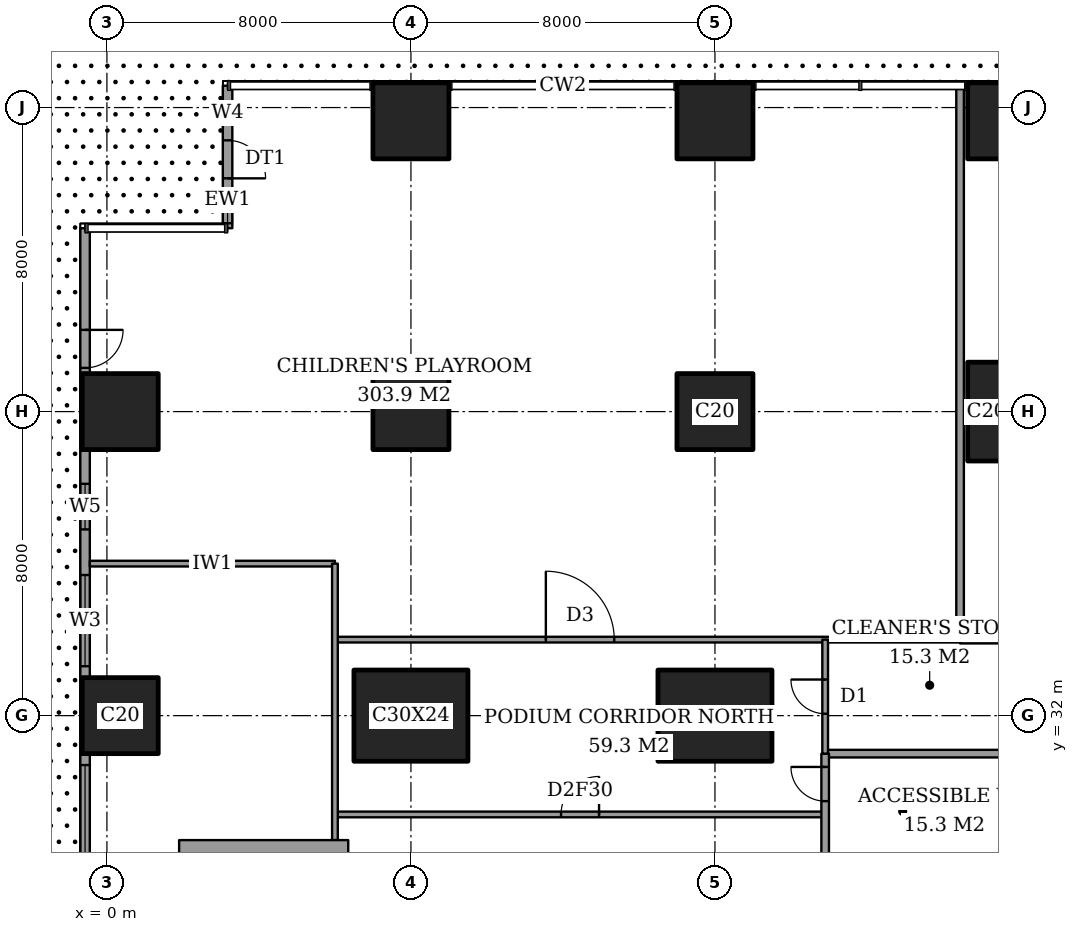
"""IFC4 building model, lengths in metres.
Left out: names, types, materials, properties, quantities, classifications, styles, units other than length and angle.
Written with IfcOpenShell. Run it as: python <this file> out.ifc"""

import sys

from ifc_helpers import new_model, si_unit, direction, frame, frame_2d, origin, origin_2d, place, context, subcontext, project, spatial, rectangle, extrude, element, fill, save


model = new_model("IFC4")
c1 = context("Model", 3, precision=1e-05, world=origin(), true_north=direction((0.0, 1.0)))
c2 = subcontext(c1, "Body", "Model", "MODEL_VIEW")
j1 = project(units=[si_unit("LENGTHUNIT", "METRE"), si_unit("PLANEANGLEUNIT", "RADIAN")], contexts=[c1])
p1 = place(None, origin())
s1 = spatial("IfcSite", under=j1, at=p1, CompositionType="ELEMENT")
p2 = place(p1, origin())
s2 = spatial("IfcBuilding", under=s1, at=p2, CompositionType="ELEMENT")
p3 = place(p2, frame((0.0, 0.0, 16.0)))
s3 = spatial("IfcBuildingStorey", under=s2, at=p3, CompositionType="ELEMENT", Elevation=16.0)
for number, where, z_axis, x_axis in (
    (1, (0.35, 32.0, 0.0), (0.0, 0.0, 1.0), (1.0, 0.0, 0.0)),
    (2, (0.35, 40.0, 0.0), (0.0, 0.0, 1.0), (1.0, 0.0, 0.0)),
):
    element("IfcColumn", number, at=place(p3, frame(where, z_axis=z_axis, x_axis=x_axis)), inside=s3, PredefinedType="COLUMN", context=c2, shape_type="SweptSolid", body=[
        extrude(rectangle(XDim=2.0, YDim=2.0, at=origin_2d()), origin(), (0.0, 0.0, 1.0), 5.0),
    ])
p4 = place(p3, frame((8.0, 32.0, 0.0), z_axis=(0.0, 0.0, 1.0), x_axis=(1.0, 0.0, 0.0)))
e3 = element("IfcColumn", 3, at=p4, inside=s3, PredefinedType="COLUMN", context=c2, shape_type="SweptSolid", body=[
    extrude(rectangle(XDim=3.0, YDim=2.4, at=origin_2d()), origin(), (0.0, 0.0, 1.0), 5.0),
])
for number, where, z_axis, x_axis in (
    (4, (8.0, 40.0, 0.0), (0.0, 0.0, 1.0), (1.0, 0.0, 0.0)),
    (5, (8.0, 47.65, 0.0), (0.0, 0.0, 1.0), (1.0, 0.0, 0.0)),
):
    element("IfcColumn", number, at=place(p3, frame(where, z_axis=z_axis, x_axis=x_axis)), inside=s3, PredefinedType="COLUMN", context=c2, shape_type="SweptSolid", body=[
        extrude(rectangle(XDim=2.0, YDim=2.0, at=origin_2d()), origin(), (0.0, 0.0, 1.0), 5.0),
    ])
p5 = place(p3, frame((16.0, 32.0, 0.0), z_axis=(0.0, 0.0, 1.0), x_axis=(1.0, 0.0, 0.0)))
e6 = element("IfcColumn", 6, at=p5, inside=s3, PredefinedType="COLUMN", context=c2, shape_type="SweptSolid", body=[
    extrude(rectangle(XDim=3.0, YDim=2.4, at=origin_2d()), origin(), (0.0, 0.0, 1.0), 5.0),
])
for number, where, z_axis, x_axis in (
    (7, (16.0, 40.0, 0.0), (0.0, 0.0, 1.0), (1.0, 0.0, 0.0)),
    (8, (16.0, 47.65, 0.0), (0.0, 0.0, 1.0), (1.0, 0.0, 0.0)),
):
    element("IfcColumn", number, at=place(p3, frame(where, z_axis=z_axis, x_axis=x_axis)), inside=s3, PredefinedType="COLUMN", context=c2, shape_type="SweptSolid", body=[
        extrude(rectangle(XDim=2.0, YDim=2.0, at=origin_2d()), origin(), (0.0, 0.0, 1.0), 5.0),
    ])
p6 = place(p3, frame((23.65, 40.0, 0.0), z_axis=(0.0, 0.0, 1.0), x_axis=(1.0, 0.0, 0.0)))
e9 = element("IfcColumn", 9, at=p6, inside=s3, PredefinedType="COLUMN", context=c2, shape_type="SweptSolid", body=[
    extrude(rectangle(XDim=2.0, YDim=2.6, at=origin_2d()), origin(), (0.0, 0.0, 1.0), 5.0),
])
p7 = place(p3, frame((23.65, 47.65, 0.0), z_axis=(0.0, 0.0, 1.0), x_axis=(1.0, 0.0, 0.0)))
e10 = element("IfcColumn", 10, at=p7, inside=s3, PredefinedType="COLUMN", context=c2, shape_type="SweptSolid", body=[
    extrude(rectangle(XDim=2.0, YDim=2.0, at=origin_2d()), origin(), (0.0, 0.0, 1.0), 5.0),
])
p8 = place(p3, frame((6.35, 28.35, 0.0), z_axis=(0.0, 0.0, 1.0), x_axis=(-1.0, 0.0, 0.0)))
e11 = element("IfcWall", 11, at=p8, inside=s3, PredefinedType="SHEAR", context=c2, shape_type="SweptSolid", body=[
    extrude(rectangle(XDim=4.45, YDim=0.75, at=frame_2d((2.225, 0.0))), origin(), (0.0, 0.0, 1.0), 5.0),
])
p9 = place(p3, frame((3.175, 48.575, 0.0), z_axis=(0.0, 0.0, 1.0), x_axis=(0.0, -1.0, 0.0)))
e12 = element("IfcWall", 12, at=p9, inside=s3, PredefinedType="SOLIDWALL", context=c2, shape_type="SweptSolid", body=[
    extrude(rectangle(XDim=3.75, YDim=0.25, at=frame_2d((1.875, 0.0))), origin(), (0.0, 0.0, 1.0), 5.0),
])
p10 = place(p9, frame((1.438, 0.0, 0.0)))
e13 = element("IfcOpeningElement", 13, at=p10, cuts=e12, PredefinedType="OPENING", context=c2, shape_type="SweptSolid", body=[
    extrude(rectangle(XDim=1.0, YDim=2.4, at=frame_2d((0.5, 1.2))), frame((0.0, 0.135, 0.0), z_axis=(0.0, -1.0, 0.0), x_axis=(1.0, 0.0, 0.0)), (0.0, 0.0, 1.0), 0.27),
])
p11 = place(p9, frame((0.406, 0.0, 0.6)))
e14 = element("IfcOpeningElement", 14, at=p11, cuts=e12, PredefinedType="OPENING", context=c2, shape_type="SweptSolid", body=[
    extrude(rectangle(XDim=0.6, YDim=3.0, at=frame_2d((0.3, 1.5))), frame((0.0, 0.135, 0.0), z_axis=(0.0, -1.0, 0.0), x_axis=(1.0, 0.0, 0.0)), (0.0, 0.0, 1.0), 0.27),
])
p12 = place(p9, frame((3.019, 0.0, 0.6)))
e15 = element("IfcOpeningElement", 15, at=p12, cuts=e12, PredefinedType="OPENING", context=c2, shape_type="SweptSolid", body=[
    extrude(rectangle(XDim=0.6, YDim=3.0, at=frame_2d((0.3, 1.5))), frame((0.0, 0.135, 0.0), z_axis=(0.0, -1.0, 0.0), x_axis=(1.0, 0.0, 0.0)), (0.0, 0.0, 1.0), 0.27),
])
p13 = place(p3, frame((-0.575, 44.825, 0.0), z_axis=(0.0, 0.0, 1.0), x_axis=(0.0, -1.0, 0.0)))
e16 = element("IfcWall", 16, at=p13, inside=s3, PredefinedType="SOLIDWALL", context=c2, shape_type="SweptSolid", body=[
    extrude(rectangle(XDim=41.65, YDim=0.25, at=frame_2d((20.825, 0.0))), origin(), (0.0, 0.0, 1.0), 5.0),
])
p14 = place(p13, frame((2.675, 0.0, 0.0)))
e17 = element("IfcOpeningElement", 17, at=p14, cuts=e16, PredefinedType="OPENING", context=c2, shape_type="SweptSolid", body=[
    extrude(rectangle(XDim=1.0, YDim=2.4, at=frame_2d((0.5, 1.2))), frame((0.0, 0.135, 0.0), z_axis=(0.0, -1.0, 0.0), x_axis=(1.0, 0.0, 0.0)), (0.0, 0.0, 1.0), 0.27),
])
p15 = place(p13, frame((6.725, 0.0, 0.6)))
e18 = element("IfcOpeningElement", 18, at=p15, cuts=e16, PredefinedType="OPENING", context=c2, shape_type="SweptSolid", body=[
    extrude(rectangle(XDim=1.2, YDim=3.0, at=frame_2d((0.6, 1.5))), frame((0.0, 0.135, 0.0), z_axis=(0.0, -1.0, 0.0), x_axis=(1.0, 0.0, 0.0)), (0.0, 0.0, 1.0), 0.27),
])
p16 = place(p13, frame((9.125, 0.0, 0.6)))
e19 = element("IfcOpeningElement", 19, at=p16, cuts=e16, PredefinedType="OPENING", context=c2, shape_type="SweptSolid", body=[
    extrude(rectangle(XDim=2.4, YDim=3.0, at=frame_2d((1.2, 1.5))), frame((0.0, 0.135, 0.0), z_axis=(0.0, -1.0, 0.0), x_axis=(1.0, 0.0, 0.0)), (0.0, 0.0, 1.0), 0.27),
])
p17 = place(p13, frame((14.125, 0.0, 0.6)))
e20 = element("IfcOpeningElement", 20, at=p17, cuts=e16, PredefinedType="OPENING", context=c2, shape_type="SweptSolid", body=[
    extrude(rectangle(XDim=2.4, YDim=3.0, at=frame_2d((1.2, 1.5))), frame((0.0, 0.135, 0.0), z_axis=(0.0, -1.0, 0.0), x_axis=(1.0, 0.0, 0.0)), (0.0, 0.0, 1.0), 0.27),
])
p18 = place(p13, frame((17.125, 0.0, 0.6)))
e21 = element("IfcOpeningElement", 21, at=p18, cuts=e16, PredefinedType="OPENING", context=c2, shape_type="SweptSolid", body=[
    extrude(rectangle(XDim=2.4, YDim=3.0, at=frame_2d((1.2, 1.5))), frame((0.0, 0.135, 0.0), z_axis=(0.0, -1.0, 0.0), x_axis=(1.0, 0.0, 0.0)), (0.0, 0.0, 1.0), 0.27),
])
p19 = place(p13, frame((22.125, 0.0, 0.6)))
e22 = element("IfcOpeningElement", 22, at=p19, cuts=e16, PredefinedType="OPENING", context=c2, shape_type="SweptSolid", body=[
    extrude(rectangle(XDim=2.4, YDim=3.0, at=frame_2d((1.2, 1.5))), frame((0.0, 0.135, 0.0), z_axis=(0.0, -1.0, 0.0), x_axis=(1.0, 0.0, 0.0)), (0.0, 0.0, 1.0), 0.27),
])
p20 = place(p13, frame((25.125, 0.0, 0.6)))
e23 = element("IfcOpeningElement", 23, at=p20, cuts=e16, PredefinedType="OPENING", context=c2, shape_type="SweptSolid", body=[
    extrude(rectangle(XDim=2.4, YDim=3.0, at=frame_2d((1.2, 1.5))), frame((0.0, 0.135, 0.0), z_axis=(0.0, -1.0, 0.0), x_axis=(1.0, 0.0, 0.0)), (0.0, 0.0, 1.0), 0.27),
])
p21 = place(p13, frame((30.125, 0.0, 0.6)))
e24 = element("IfcOpeningElement", 24, at=p21, cuts=e16, PredefinedType="OPENING", context=c2, shape_type="SweptSolid", body=[
    extrude(rectangle(XDim=2.4, YDim=3.0, at=frame_2d((1.2, 1.5))), frame((0.0, 0.135, 0.0), z_axis=(0.0, -1.0, 0.0), x_axis=(1.0, 0.0, 0.0)), (0.0, 0.0, 1.0), 0.27),
])
p22 = place(p13, frame((37.975, 0.0, 0.0)))
e25 = element("IfcOpeningElement", 25, at=p22, cuts=e16, PredefinedType="OPENING", context=c2, shape_type="SweptSolid", body=[
    extrude(rectangle(XDim=1.0, YDim=2.4, at=frame_2d((0.5, 1.2))), frame((0.0, 0.135, 0.0), z_axis=(0.0, -1.0, 0.0), x_axis=(1.0, 0.0, 0.0)), (0.0, 0.0, 1.0), 0.27),
])
p23 = place(p13, frame((33.125, 0.0, 0.6)))
e26 = element("IfcOpeningElement", 26, at=p23, cuts=e16, PredefinedType="OPENING", context=c2, shape_type="SweptSolid", body=[
    extrude(rectangle(XDim=2.4, YDim=3.0, at=frame_2d((1.2, 1.5))), frame((0.0, 0.135, 0.0), z_axis=(0.0, -1.0, 0.0), x_axis=(1.0, 0.0, 0.0)), (0.0, 0.0, 1.0), 0.27),
])
p24 = place(p3, frame((6.0, 29.4, 0.0), z_axis=(0.0, 0.0, 1.0), x_axis=(1.0, 0.0, 0.0)))
e27 = element("IfcWall", 27, at=p24, inside=s3, PredefinedType="PARTITIONING", context=c2, shape_type="SweptSolid", body=[
    extrude(rectangle(XDim=12.9, YDim=0.15, at=frame_2d((6.45, 0.0))), origin(), (0.0, 0.0, 1.0), 4.7),
])
p25 = place(p24, frame((5.95, 0.0, 0.0)))
e28 = element("IfcOpeningElement", 28, at=p25, cuts=e27, PredefinedType="OPENING", context=c2, shape_type="SweptSolid", body=[
    extrude(rectangle(XDim=1.0, YDim=2.1, at=frame_2d((0.5, 1.05))), frame((0.0, 0.085, 0.0), z_axis=(0.0, -1.0, 0.0), x_axis=(1.0, 0.0, 0.0)), (0.0, 0.0, 1.0), 0.17),
])
p26 = place(p3, frame((18.9, 31.0, 0.0), z_axis=(0.0, 0.0, 1.0), x_axis=(1.0, 0.0, 0.0)))
e29 = element("IfcWall", 29, at=p26, inside=s3, PredefinedType="PARTITIONING", context=c2, shape_type="SweptSolid", body=[
    extrude(rectangle(XDim=5.1, YDim=0.2, at=frame_2d((2.55, 0.0))), origin(), (0.0, 0.0, 1.0), 4.7),
])
p27 = place(p3, frame((22.45, 34.0, 0.0), z_axis=(0.0, 0.0, 1.0), x_axis=(1.0, 0.0, 0.0)))
e30 = element("IfcWall", 30, at=p27, inside=s3, PredefinedType="PARTITIONING", context=c2, shape_type="SweptSolid", body=[
    extrude(rectangle(XDim=1.55, YDim=0.2, at=frame_2d((0.775, 0.0))), origin(), (0.0, 0.0, 1.0), 4.7),
])
p28 = place(p3, frame((6.0, 34.0, 0.0), z_axis=(0.0, 0.0, 1.0), x_axis=(1.0, 0.0, 0.0)))
e31 = element("IfcWall", 31, at=p28, inside=s3, PredefinedType="PARTITIONING", context=c2, shape_type="SweptSolid", body=[
    extrude(rectangle(XDim=16.45, YDim=0.15, at=frame_2d((8.225, 0.0))), origin(), (0.0, 0.0, 1.0), 4.7),
])
p29 = place(p28, frame((5.55, 0.0, 0.0)))
e32 = element("IfcOpeningElement", 32, at=p29, cuts=e31, PredefinedType="OPENING", context=c2, shape_type="SweptSolid", body=[
    extrude(rectangle(XDim=1.8, YDim=2.1, at=frame_2d((0.9, 1.05))), frame((0.0, 0.085, 0.0), z_axis=(0.0, -1.0, 0.0), x_axis=(1.0, 0.0, 0.0)), (0.0, 0.0, 1.0), 0.17),
])
p30 = place(p3, frame((-0.45, 36.0, 0.0), z_axis=(0.0, 0.0, 1.0), x_axis=(1.0, 0.0, 0.0)))
e33 = element("IfcWall", 33, at=p30, inside=s3, PredefinedType="PARTITIONING", context=c2, shape_type="SweptSolid", body=[
    extrude(rectangle(XDim=6.45, YDim=0.15, at=frame_2d((3.225, 0.0))), origin(), (0.0, 0.0, 1.0), 4.7),
])
p31 = place(p3, frame((6.0, 28.725, 0.0), z_axis=(0.0, 0.0, 1.0), x_axis=(0.0, 1.0, 0.0)))
e34 = element("IfcWall", 34, at=p31, inside=s3, PredefinedType="PARTITIONING", context=c2, shape_type="SweptSolid", body=[
    extrude(rectangle(XDim=7.275, YDim=0.15, at=frame_2d((3.637, 0.0))), origin(), (0.0, 0.0, 1.0), 4.7),
])
p32 = place(p3, frame((18.9, 28.0, 0.0), z_axis=(0.0, 0.0, 1.0), x_axis=(0.0, 1.0, 0.0)))
e35 = element("IfcWall", 35, at=p32, inside=s3, PredefinedType="PARTITIONING", context=c2, shape_type="SweptSolid", body=[
    extrude(rectangle(XDim=3.0, YDim=0.2, at=frame_2d((1.5, 0.0))), origin(), (0.0, 0.0, 1.0), 4.7),
])
p33 = place(p32, frame((1.75, 0.0, 0.0)))
e36 = element("IfcOpeningElement", 36, at=p33, cuts=e35, PredefinedType="OPENING", context=c2, shape_type="SweptSolid", body=[
    extrude(rectangle(XDim=0.9, YDim=2.1, at=frame_2d((0.45, 1.05))), frame((0.0, 0.11, 0.0), z_axis=(0.0, -1.0, 0.0), x_axis=(1.0, 0.0, 0.0)), (0.0, 0.0, 1.0), 0.22),
])
p34 = place(p3, frame((18.9, 31.0, 0.0), z_axis=(0.0, 0.0, 1.0), x_axis=(0.0, 1.0, 0.0)))
e37 = element("IfcWall", 37, at=p34, inside=s3, PredefinedType="PARTITIONING", context=c2, shape_type="SweptSolid", body=[
    extrude(rectangle(XDim=3.0, YDim=0.15, at=frame_2d((1.5, 0.0))), origin(), (0.0, 0.0, 1.0), 4.7),
])
p35 = place(p34, frame((1.05, 0.0, 0.0)))
e38 = element("IfcOpeningElement", 38, at=p35, cuts=e37, PredefinedType="OPENING", context=c2, shape_type="SweptSolid", body=[
    extrude(rectangle(XDim=0.9, YDim=2.1, at=frame_2d((0.45, 1.05))), frame((0.0, 0.085, 0.0), z_axis=(0.0, -1.0, 0.0), x_axis=(1.0, 0.0, 0.0)), (0.0, 0.0, 1.0), 0.17),
])
p36 = place(p3, frame((22.45, 34.0, 0.0), z_axis=(0.0, 0.0, 1.0), x_axis=(0.0, 1.0, 0.0)))
e39 = element("IfcWall", 39, at=p36, inside=s3, PredefinedType="PARTITIONING", context=c2, shape_type="SweptSolid", body=[
    extrude(rectangle(XDim=14.561, YDim=0.2, at=frame_2d((7.281, 0.0))), origin(), (0.0, 0.0, 1.0), 4.7),
])
p37 = place(p10, origin())
e40 = element("IfcDoor", 40, at=p37, inside=s3, OperationType="SINGLE_SWING_LEFT", PredefinedType="DOOR", context=c2, shape_type="SweptSolid", body=[
    extrude(rectangle(XDim=1.0, YDim=2.4, at=frame_2d((0.5, 1.2))), frame((0.0, 0.025, 0.0), z_axis=(0.0, -1.0, 0.0), x_axis=(1.0, 0.0, 0.0)), (0.0, 0.0, 1.0), 0.05),
])
fill(e13, e40)
p38 = place(p11, origin())
e41 = element("IfcWindow", 41, at=p38, inside=s3, PartitioningType="SINGLE_PANEL", PredefinedType="WINDOW", context=c2, shape_type="SweptSolid", body=[
    extrude(rectangle(XDim=0.6, YDim=3.0, at=frame_2d((0.3, 1.5))), frame((0.0, 0.03, 0.0), z_axis=(0.0, -1.0, 0.0), x_axis=(1.0, 0.0, 0.0)), (0.0, 0.0, 1.0), 0.06),
])
fill(e14, e41)
p39 = place(p12, origin())
e42 = element("IfcWindow", 42, at=p39, inside=s3, PartitioningType="SINGLE_PANEL", PredefinedType="WINDOW", context=c2, shape_type="SweptSolid", body=[
    extrude(rectangle(XDim=0.6, YDim=3.0, at=frame_2d((0.3, 1.5))), frame((0.0, 0.03, 0.0), z_axis=(0.0, -1.0, 0.0), x_axis=(1.0, 0.0, 0.0)), (0.0, 0.0, 1.0), 0.06),
])
fill(e15, e42)
p40 = place(p14, origin())
e43 = element("IfcDoor", 43, at=p40, inside=s3, OperationType="SINGLE_SWING_RIGHT", PredefinedType="DOOR", context=c2, shape_type="SweptSolid", body=[
    extrude(rectangle(XDim=1.0, YDim=2.4, at=frame_2d((0.5, 1.2))), frame((0.0, 0.025, 0.0), z_axis=(0.0, -1.0, 0.0), x_axis=(1.0, 0.0, 0.0)), (0.0, 0.0, 1.0), 0.05),
])
fill(e17, e43)
p41 = place(p15, origin())
e44 = element("IfcWindow", 44, at=p41, inside=s3, PartitioningType="SINGLE_PANEL", PredefinedType="WINDOW", context=c2, shape_type="SweptSolid", body=[
    extrude(rectangle(XDim=1.2, YDim=3.0, at=frame_2d((0.6, 1.5))), frame((0.0, 0.03, 0.0), z_axis=(0.0, -1.0, 0.0), x_axis=(1.0, 0.0, 0.0)), (0.0, 0.0, 1.0), 0.06),
])
fill(e18, e44)
p42 = place(p16, origin())
e45 = element("IfcWindow", 45, at=p42, inside=s3, PartitioningType="SINGLE_PANEL", PredefinedType="WINDOW", context=c2, shape_type="SweptSolid", body=[
    extrude(rectangle(XDim=2.4, YDim=3.0, at=frame_2d((1.2, 1.5))), frame((0.0, 0.03, 0.0), z_axis=(0.0, -1.0, 0.0), x_axis=(1.0, 0.0, 0.0)), (0.0, 0.0, 1.0), 0.06),
])
fill(e19, e45)
p43 = place(p17, origin())
e46 = element("IfcWindow", 46, at=p43, inside=s3, PartitioningType="SINGLE_PANEL", PredefinedType="WINDOW", context=c2, shape_type="SweptSolid", body=[
    extrude(rectangle(XDim=2.4, YDim=3.0, at=frame_2d((1.2, 1.5))), frame((0.0, 0.03, 0.0), z_axis=(0.0, -1.0, 0.0), x_axis=(1.0, 0.0, 0.0)), (0.0, 0.0, 1.0), 0.06),
])
fill(e20, e46)
p44 = place(p29, origin())
e47 = element("IfcDoor", 47, at=p44, inside=s3, OperationType="DOUBLE_DOOR_DOUBLE_SWING", PredefinedType="DOOR", context=c2, shape_type="SweptSolid", body=[
    extrude(rectangle(XDim=1.8, YDim=2.1, at=frame_2d((0.9, 1.05))), frame((0.0, 0.025, 0.0), z_axis=(0.0, -1.0, 0.0), x_axis=(1.0, 0.0, 0.0)), (0.0, 0.0, 1.0), 0.05),
])
fill(e32, e47)
p45 = place(p33, origin())
e48 = element("IfcDoor", 48, at=p45, inside=s3, OperationType="SINGLE_SWING_LEFT", PredefinedType="DOOR", context=c2, shape_type="SweptSolid", body=[
    extrude(rectangle(XDim=0.9, YDim=2.1, at=frame_2d((0.45, 1.05))), frame((0.0, 0.025, 0.0), z_axis=(0.0, -1.0, 0.0), x_axis=(1.0, 0.0, 0.0)), (0.0, 0.0, 1.0), 0.05),
])
fill(e36, e48)
p46 = place(p25, origin())
e49 = element("IfcDoor", 49, at=p46, inside=s3, OperationType="SINGLE_SWING_LEFT", PredefinedType="DOOR", context=c2, shape_type="SweptSolid", body=[
    extrude(rectangle(XDim=1.0, YDim=2.1, at=frame_2d((0.5, 1.05))), frame((0.0, 0.025, 0.0), z_axis=(0.0, -1.0, 0.0), x_axis=(1.0, 0.0, 0.0)), (0.0, 0.0, 1.0), 0.05),
])
fill(e28, e49)
p47 = place(p35, origin())
e50 = element("IfcDoor", 50, at=p47, inside=s3, OperationType="SINGLE_SWING_LEFT", PredefinedType="DOOR", context=c2, shape_type="SweptSolid", body=[
    extrude(rectangle(XDim=0.9, YDim=2.1, at=frame_2d((0.45, 1.05))), frame((0.0, 0.025, 0.0), z_axis=(0.0, -1.0, 0.0), x_axis=(1.0, 0.0, 0.0)), (0.0, 0.0, 1.0), 0.05),
])
fill(e38, e50)
save(model, sys.argv[1])
